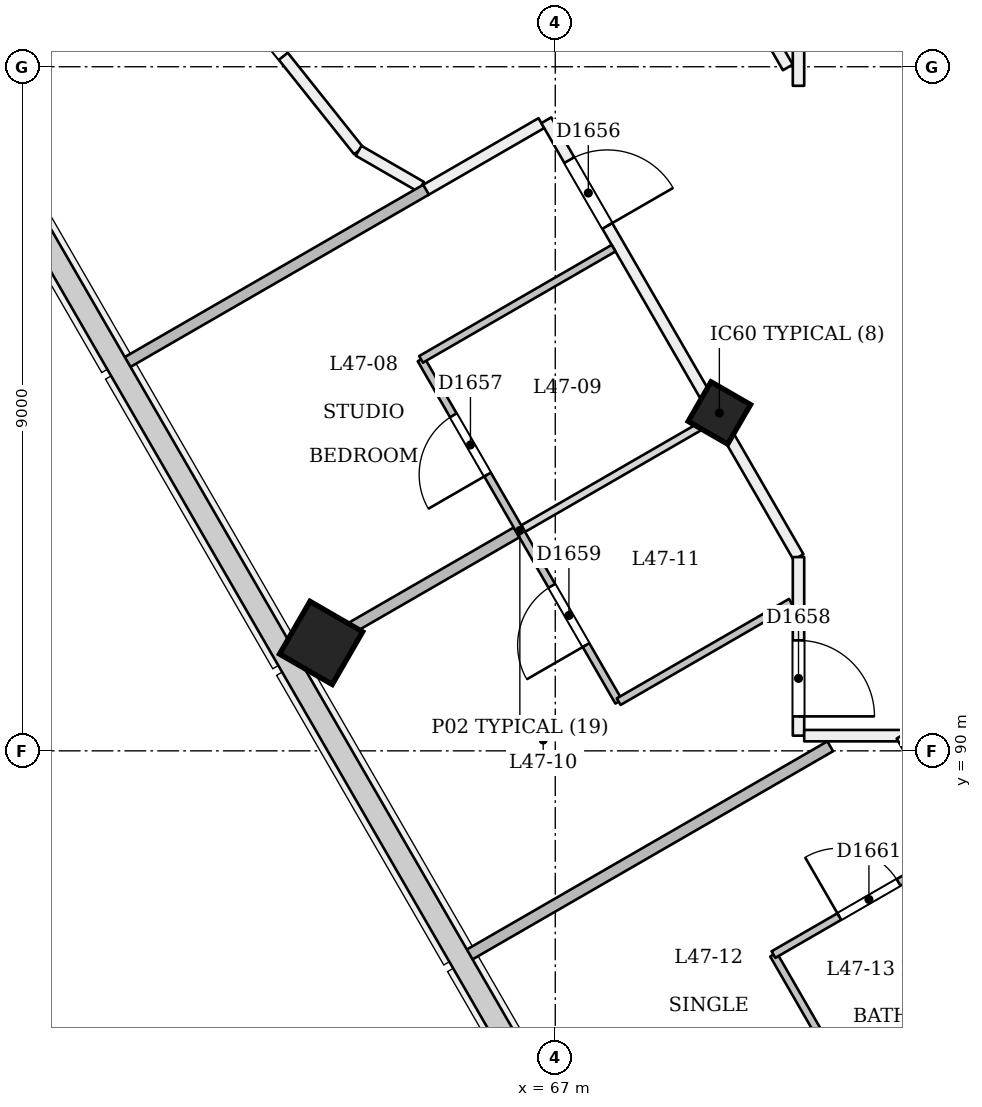
"""IFC4 building model, lengths in metres.
Left out: names, types, materials, properties, quantities, classifications, styles, units other than length and angle.
Written with IfcOpenShell. Run it as: python <this file> out.ifc"""

import sys

from ifc_helpers import new_model, si_unit, direction, frame, frame_2d, origin, origin_2d, place, context, subcontext, project, spatial, rectangle, extrude, element, fill, save


model = new_model("IFC4")
c1 = context("Model", 3, precision=1e-05, world=origin(), true_north=direction((0.0, 1.0)))
c2 = subcontext(c1, "Body", "Model", "MODEL_VIEW")
j1 = project(units=[si_unit("LENGTHUNIT", "METRE"), si_unit("PLANEANGLEUNIT", "RADIAN")], contexts=[c1])
p1 = place(None, origin())
s1 = spatial("IfcSite", under=j1, at=p1, CompositionType="ELEMENT")
p2 = place(p1, origin())
s2 = spatial("IfcBuilding", under=s1, at=p2, CompositionType="ELEMENT")
p3 = place(p2, frame((0.0, 0.0, 181.8)))
s3 = spatial("IfcBuildingStorey", under=s2, at=p3, CompositionType="ELEMENT", Elevation=181.8)
p4 = place(p3, frame((69.132, 94.398, -0.018), z_axis=(0.02215369191, 0.038413282303, 0.999016333038), x_axis=(-0.865360860763, -0.499675692985, 0.038402897016)))
e1 = element("IfcColumn", 1, at=p4, inside=s3, PredefinedType="COLUMN", context=c2, shape_type="SweptSolid", body=[
    extrude(rectangle(XDim=0.6, YDim=0.6, at=origin_2d()), origin(), (0.0, 0.0, 1.0), 3.604),
])
p5 = place(p3, frame((63.892, 91.373, -0.024), z_axis=(0.02222134892, 0.038480872521, 0.999012229206), x_axis=(-0.865640963928, -0.49918413288, 0.03848276303)))
e2 = element("IfcColumn", 2, at=p5, inside=s3, PredefinedType="COLUMN", context=c2, shape_type="SweptSolid", body=[
    extrude(rectangle(XDim=0.8, YDim=0.8, at=origin_2d()), origin(), (0.0, 0.0, 1.0), 3.604),
])
p6 = place(p3, frame((65.28, 97.371, 0.0), z_axis=(0.0, 0.0, 1.0), x_axis=(0.865965678975, 0.50010343214, 0.0)))
e3 = element("IfcWall", 3, at=p6, inside=s3, PredefinedType="PARTITIONING", context=c2, shape_type="SweptSolid", body=[
    extrude(rectangle(XDim=1.775, YDim=0.15, at=frame_2d((0.887, 0.0))), origin(), (0.0, 0.0, 1.0), 3.15),
])
p7 = place(p3, frame((66.882, 98.296, 0.0), z_axis=(0.0, 0.0, 1.0), x_axis=(0.500009088543, -0.866020156448, 0.0)))
e4 = element("IfcWall", 4, at=p7, inside=s3, PredefinedType="PARTITIONING", context=c2, shape_type="SweptSolid", body=[
    extrude(rectangle(XDim=6.636, YDim=0.15, at=frame_2d((3.318, 0.0))), origin(), (0.0, 0.0, 1.0), 2.75),
])
p8 = place(p7, frame((0.605, 0.0, 0.0)))
e5 = element("IfcOpeningElement", 5, at=p8, cuts=e4, PredefinedType="OPENING", context=c2, shape_type="SweptSolid", body=[
    extrude(rectangle(XDim=1.0, YDim=2.1, at=frame_2d((0.5, 1.05))), frame((0.0, 0.085, 0.0), z_axis=(0.0, -1.0, 0.0), x_axis=(1.0, 0.0, 0.0)), (0.0, 0.0, 1.0), 0.171),
])
p9 = place(p3, frame((70.2, 92.549, 0.0), z_axis=(0.0, 0.0, 1.0), x_axis=(0.0, -1.0, 0.0)))
e6 = element("IfcWall", 6, at=p9, inside=s3, PredefinedType="PARTITIONING", context=c2, shape_type="SweptSolid", body=[
    extrude(rectangle(XDim=2.349, YDim=0.15, at=frame_2d((1.175, 0.0))), origin(), (0.0, 0.0, 1.0), 3.15),
])
p10 = place(p9, frame((1.096, 0.0, 0.0)))
e7 = element("IfcOpeningElement", 7, at=p10, cuts=e6, PredefinedType="OPENING", context=c2, shape_type="SweptSolid", body=[
    extrude(rectangle(XDim=1.0, YDim=2.1, at=frame_2d((0.5, 1.05))), frame((0.0, 0.085, 0.0), z_axis=(0.0, -1.0, 0.0), x_axis=(1.0, 0.0, 0.0)), (0.0, 0.0, 1.0), 0.171),
])
p11 = place(p3, frame((70.275, 90.2, 0.0), z_axis=(0.0, 0.0, 1.0), x_axis=(1.0, 0.0, 0.0)))
e8 = element("IfcWall", 8, at=p11, inside=s3, PredefinedType="PARTITIONING", context=c2, shape_type="SweptSolid", body=[
    extrude(rectangle(XDim=1.281, YDim=0.15, at=frame_2d((0.641, 0.0))), origin(), (0.0, 0.0, 1.0), 3.15),
])
p12 = place(p3, frame((71.556, 90.2, 0.0), z_axis=(0.0, 0.0, 1.0), x_axis=(0.499999195485, -0.866025868271, 0.0)))
e9 = element("IfcWall", 9, at=p12, inside=s3, PredefinedType="PARTITIONING", context=c2, shape_type="SweptSolid", body=[
    extrude(rectangle(XDim=26.651, YDim=0.15, at=frame_2d((13.326, 0.0))), origin(), (0.0, 0.0, 1.0), 2.75),
])
p13 = place(p12, frame((0.381, 0.0, 0.0)))
e10 = element("IfcOpeningElement", 10, at=p13, cuts=e9, PredefinedType="OPENING", context=c2, shape_type="SweptSolid", body=[
    extrude(rectangle(XDim=1.0, YDim=2.1, at=frame_2d((0.5, 1.05))), frame((0.0, 0.085, 0.0), z_axis=(0.0, -1.0, 0.0), x_axis=(1.0, 0.0, 0.0)), (0.0, 0.0, 1.0), 0.171),
])
p14 = place(p12, frame((7.047, 0.0, 0.0)))
e11 = element("IfcOpeningElement", 11, at=p14, cuts=e9, PredefinedType="OPENING", context=c2, shape_type="SweptSolid", body=[
    extrude(rectangle(XDim=1.0, YDim=2.1, at=frame_2d((0.5, 1.05))), frame((0.0, 0.085, 0.0), z_axis=(0.0, -1.0, 0.0), x_axis=(1.0, 0.0, 0.0)), (0.0, 0.0, 1.0), 0.171),
])
p15 = place(p12, frame((10.402, 0.0, 0.0)))
e12 = element("IfcOpeningElement", 12, at=p15, cuts=e9, PredefinedType="OPENING", context=c2, shape_type="SweptSolid", body=[
    extrude(rectangle(XDim=1.0, YDim=2.1, at=frame_2d((0.5, 1.05))), frame((0.0, 0.085, 0.0), z_axis=(0.0, -1.0, 0.0), x_axis=(1.0, 0.0, 0.0)), (0.0, 0.0, 1.0), 0.171),
])
p16 = place(p12, frame((14.902, 0.0, 0.0)))
e13 = element("IfcOpeningElement", 13, at=p16, cuts=e9, PredefinedType="OPENING", context=c2, shape_type="SweptSolid", body=[
    extrude(rectangle(XDim=1.0, YDim=2.1, at=frame_2d((0.5, 1.05))), frame((0.0, 0.085, 0.0), z_axis=(0.0, -1.0, 0.0), x_axis=(1.0, 0.0, 0.0)), (0.0, 0.0, 1.0), 0.171),
])
p17 = place(p12, frame((18.372, 0.0, 0.0)))
e14 = element("IfcOpeningElement", 14, at=p17, cuts=e9, PredefinedType="OPENING", context=c2, shape_type="SweptSolid", body=[
    extrude(rectangle(XDim=1.0, YDim=2.1, at=frame_2d((0.5, 1.05))), frame((0.0, 0.085, 0.0), z_axis=(0.0, -1.0, 0.0), x_axis=(1.0, 0.0, 0.0)), (0.0, 0.0, 1.0), 0.171),
])
p18 = place(p12, frame((24.933, 0.0, 0.0)))
e15 = element("IfcOpeningElement", 15, at=p18, cuts=e9, PredefinedType="OPENING", context=c2, shape_type="SweptSolid", body=[
    extrude(rectangle(XDim=1.0, YDim=2.1, at=frame_2d((0.5, 1.05))), frame((0.0, 0.085, 0.0), z_axis=(0.0, -1.0, 0.0), x_axis=(1.0, 0.0, 0.0)), (0.0, 0.0, 1.0), 0.171),
])
p19 = place(p3, frame((70.2, 101.4, 0.0), z_axis=(0.0, 0.0, 1.0), x_axis=(0.0, -1.0, 0.0)))
e16 = element("IfcWall", 16, at=p19, inside=s3, PredefinedType="PARTITIONING", context=c2, shape_type="SweptSolid", body=[
    extrude(rectangle(XDim=2.651, YDim=0.15, at=frame_2d((1.325, 0.0))), origin(), (0.0, 0.0, 1.0), 3.15),
])
p20 = place(p3, frame((70.06, 98.992, 0.0), z_axis=(0.0, 0.0, 1.0), x_axis=(-0.500027893485, 0.866009298874, 0.0)))
e17 = element("IfcWall", 17, at=p20, inside=s3, PredefinedType="PARTITIONING", context=c2, shape_type="SweptSolid", body=[
    extrude(rectangle(XDim=2.053, YDim=0.15, at=frame_2d((1.026, 0.0))), origin(), (0.0, 0.0, 1.0), 3.15),
])
p21 = place(p3, frame((62.492, 100.303, 0.0), z_axis=(0.0, 0.0, 1.0), x_axis=(0.623399088772, -0.781903815132, 0.0)))
e18 = element("IfcWall", 18, at=p21, inside=s3, PredefinedType="PARTITIONING", context=c2, shape_type="SweptSolid", body=[
    extrude(rectangle(XDim=3.081, YDim=0.15, at=frame_2d((1.54, 0.0))), origin(), (0.0, 0.0, 1.0), 3.15),
])
p22 = place(p21, frame((0.291, 0.0, 0.0)))
e19 = element("IfcOpeningElement", 19, at=p22, cuts=e18, PredefinedType="OPENING", context=c2, shape_type="SweptSolid", body=[
    extrude(rectangle(XDim=1.2, YDim=2.1, at=frame_2d((0.6, 1.05))), frame((0.0, 0.085, 0.0), z_axis=(0.0, -1.0, 0.0), x_axis=(1.0, 0.0, 0.0)), (0.0, 0.0, 1.0), 0.171),
])
p23 = place(p3, frame((64.413, 97.895, 0.0), z_axis=(0.0, 0.0, 1.0), x_axis=(0.865919612642, -0.500183190883, 0.0)))
e20 = element("IfcWall", 20, at=p23, inside=s3, PredefinedType="PARTITIONING", context=c2, shape_type="SweptSolid", body=[
    extrude(rectangle(XDim=0.948, YDim=0.15, at=frame_2d((0.474, 0.0))), origin(), (0.0, 0.0, 1.0), 3.15),
])
p24 = place(p3, frame((67.834, 90.647, 0.0), z_axis=(0.0, 0.0, 1.0), x_axis=(-0.500027264788, 0.866009661879, 0.0)))
e21 = element("IfcWall", 21, at=p24, inside=s3, PredefinedType="PARTITIONING", context=c2, shape_type="SweptSolid", body=[
    extrude(rectangle(XDim=5.2, YDim=0.1, at=frame_2d((2.6, 0.0))), origin(), (0.0, 0.0, 1.0), 2.75),
])
p25 = place(p24, frame((3.45, 0.0, 0.0)))
e22 = element("IfcOpeningElement", 22, at=p25, cuts=e21, PredefinedType="OPENING", context=c2, shape_type="SweptSolid", body=[
    extrude(rectangle(XDim=0.9, YDim=2.1, at=frame_2d((0.45, 1.05))), frame((0.0, 0.061, 0.0), z_axis=(0.0, -1.0, 0.0), x_axis=(1.0, 0.0, 0.0)), (0.0, 0.0, 1.0), 0.121),
])
p26 = place(p24, frame((0.859, 0.0, 0.0)))
e23 = element("IfcOpeningElement", 23, at=p26, cuts=e21, PredefinedType="OPENING", context=c2, shape_type="SweptSolid", body=[
    extrude(rectangle(XDim=0.9, YDim=2.1, at=frame_2d((0.45, 1.05))), frame((0.0, 0.061, 0.0), z_axis=(0.0, -1.0, 0.0), x_axis=(1.0, 0.0, 0.0)), (0.0, 0.0, 1.0), 0.121),
])
p27 = place(p3, frame((65.234, 95.15, 0.0), z_axis=(0.0, 0.0, 1.0), x_axis=(0.86601045545, 0.500025890382, 0.0)))
e24 = element("IfcWall", 24, at=p27, inside=s3, PredefinedType="PARTITIONING", context=c2, shape_type="SweptSolid", body=[
    extrude(rectangle(XDim=2.925, YDim=0.1, at=frame_2d((1.462, 0.0))), origin(), (0.0, 0.0, 1.0), 3.15),
])
p28 = place(p3, frame((63.59, 91.199, 0.0), z_axis=(0.0, 0.0, 1.0), x_axis=(0.866014461049, 0.500018952895, 0.0)))
e25 = element("IfcWall", 25, at=p28, inside=s3, PredefinedType="PARTITIONING", context=c2, shape_type="SweptSolid", body=[
    extrude(rectangle(XDim=3.35, YDim=0.15, at=frame_2d((1.675, 0.0))), origin(), (0.0, 0.0, 1.0), 2.65),
])
p29 = place(p3, frame((65.3, 97.383, 0.0), z_axis=(0.0, 0.0, 1.0), x_axis=(-0.866033350373, -0.499986235851, 0.0)))
e26 = element("IfcWall", 26, at=p29, inside=s3, PredefinedType="PARTITIONING", context=c2, shape_type="SweptSolid", body=[
    extrude(rectangle(XDim=4.594, YDim=0.15, at=frame_2d((2.297, 0.0))), origin(), (0.0, 0.0, 1.0), 2.65),
])
p30 = place(p3, frame((66.577, 92.924, 0.0), z_axis=(0.0, 0.0, 1.0), x_axis=(0.866018712932, 0.500011588718, 0.0)))
e27 = element("IfcWall", 27, at=p30, inside=s3, PredefinedType="PARTITIONING", context=c2, shape_type="SweptSolid", body=[
    extrude(rectangle(XDim=2.875, YDim=0.1, at=frame_2d((1.438, 0.0))), origin(), (0.0, 0.0, 1.0), 2.75),
])
p31 = place(p3, frame((70.1, 91.955, 0.0), z_axis=(0.0, 0.0, 1.0), x_axis=(-0.866041074705, -0.499972856187, 0.0)))
e28 = element("IfcWall", 28, at=p31, inside=s3, PredefinedType="PARTITIONING", context=c2, shape_type="SweptSolid", body=[
    extrude(rectangle(XDim=2.616, YDim=0.1, at=frame_2d((1.308, 0.0))), origin(), (0.0, 0.0, 1.0), 3.15),
])
p32 = place(p3, frame((65.822, 87.292, 0.0), z_axis=(0.0, 0.0, 1.0), x_axis=(0.866020375458, 0.500008709215, 0.0)))
e29 = element("IfcWall", 29, at=p32, inside=s3, PredefinedType="PARTITIONING", context=c2, shape_type="SweptSolid", body=[
    extrude(rectangle(XDim=5.537, YDim=0.15, at=frame_2d((2.769, 0.0))), origin(), (0.0, 0.0, 1.0), 2.65),
])
p33 = place(p3, frame((71.121, 85.155, 0.0), z_axis=(0.0, 0.0, 1.0), x_axis=(-0.500004234368, 0.866022959057, 0.0)))
e30 = element("IfcWall", 30, at=p33, inside=s3, PredefinedType="PARTITIONING", context=c2, shape_type="SweptSolid", body=[
    extrude(rectangle(XDim=2.5, YDim=0.1, at=frame_2d((1.25, 0.0))), origin(), (0.0, 0.0, 1.0), 2.75),
])
p34 = place(p3, frame((69.871, 87.32, 0.0), z_axis=(0.0, 0.0, 1.0), x_axis=(0.866011447264, 0.500024172624, 0.0)))
e31 = element("IfcWall", 31, at=p34, inside=s3, PredefinedType="PARTITIONING", context=c2, shape_type="SweptSolid", body=[
    extrude(rectangle(XDim=2.825, YDim=0.1, at=frame_2d((1.413, 0.0))), origin(), (0.0, 0.0, 1.0), 3.15),
])
p35 = place(p34, frame((1.0, 0.0, 0.0)))
e32 = element("IfcOpeningElement", 32, at=p35, cuts=e31, PredefinedType="OPENING", context=c2, shape_type="SweptSolid", body=[
    extrude(rectangle(XDim=0.9, YDim=2.1, at=frame_2d((0.45, 1.05))), frame((0.0, 0.061, 0.0), z_axis=(0.0, -1.0, 0.0), x_axis=(1.0, 0.0, 0.0)), (0.0, 0.0, 1.0), 0.121),
])
p36 = place(p3, frame((71.103, 85.145, 0.0), z_axis=(0.0, 0.0, 1.0), x_axis=(0.866011243319, 0.500024525844, 0.0)))
e33 = element("IfcWall", 33, at=p36, inside=s3, PredefinedType="PARTITIONING", context=c2, shape_type="SweptSolid", body=[
    extrude(rectangle(XDim=2.845, YDim=0.1, at=frame_2d((1.422, 0.0))), origin(), (0.0, 0.0, 1.0), 2.75),
])
p37 = place(p8, origin())
e34 = element("IfcDoor", 34, at=p37, inside=s3, OperationType="SINGLE_SWING_RIGHT", PredefinedType="NOTDEFINED", context=c2, shape_type="SweptSolid", body=[
    extrude(rectangle(XDim=1.0, YDim=2.1, at=frame_2d((0.5, 1.05))), frame((0.0, 0.025, 0.0), z_axis=(0.0, -1.0, 0.0), x_axis=(1.0, 0.0, 0.0)), (0.0, 0.0, 1.0), 0.05),
])
fill(e5, e34)
p38 = place(p25, origin())
e35 = element("IfcDoor", 35, at=p38, inside=s3, OperationType="SINGLE_SWING_LEFT", PredefinedType="NOTDEFINED", context=c2, shape_type="SweptSolid", body=[
    extrude(rectangle(XDim=0.9, YDim=2.1, at=frame_2d((0.45, 1.05))), frame((0.0, 0.025, 0.0), z_axis=(0.0, -1.0, 0.0), x_axis=(1.0, 0.0, 0.0)), (0.0, 0.0, 1.0), 0.05),
])
fill(e22, e35)
p39 = place(p10, origin())
e36 = element("IfcDoor", 36, at=p39, inside=s3, OperationType="SINGLE_SWING_RIGHT", PredefinedType="NOTDEFINED", context=c2, shape_type="SweptSolid", body=[
    extrude(rectangle(XDim=1.0, YDim=2.1, at=frame_2d((0.5, 1.05))), frame((0.0, 0.025, 0.0), z_axis=(0.0, -1.0, 0.0), x_axis=(1.0, 0.0, 0.0)), (0.0, 0.0, 1.0), 0.05),
])
fill(e7, e36)
p40 = place(p26, origin())
e37 = element("IfcDoor", 37, at=p40, inside=s3, OperationType="SINGLE_SWING_LEFT", PredefinedType="NOTDEFINED", context=c2, shape_type="SweptSolid", body=[
    extrude(rectangle(XDim=0.9, YDim=2.1, at=frame_2d((0.45, 1.05))), frame((0.0, 0.025, 0.0), z_axis=(0.0, -1.0, 0.0), x_axis=(1.0, 0.0, 0.0)), (0.0, 0.0, 1.0), 0.05),
])
fill(e23, e37)
p41 = place(p35, origin())
e38 = element("IfcDoor", 38, at=p41, inside=s3, OperationType="SINGLE_SWING_LEFT", PredefinedType="NOTDEFINED", context=c2, shape_type="SweptSolid", body=[
    extrude(rectangle(XDim=0.9, YDim=2.1, at=frame_2d((0.45, 1.05))), frame((0.0, 0.025, 0.0), z_axis=(0.0, -1.0, 0.0), x_axis=(1.0, 0.0, 0.0)), (0.0, 0.0, 1.0), 0.05),
])
fill(e32, e38)
p42 = place(p22, origin())
e39 = element("IfcDoor", 39, at=p42, inside=s3, OperationType="SINGLE_SWING_LEFT", PredefinedType="NOTDEFINED", context=c2, shape_type="SweptSolid", body=[
    extrude(rectangle(XDim=1.2, YDim=2.1, at=frame_2d((0.6, 1.05))), frame((0.0, 0.025, 0.0), z_axis=(0.0, -1.0, 0.0), x_axis=(1.0, 0.0, 0.0)), (0.0, 0.0, 1.0), 0.05),
])
fill(e19, e39)
save(model, sys.argv[1])
